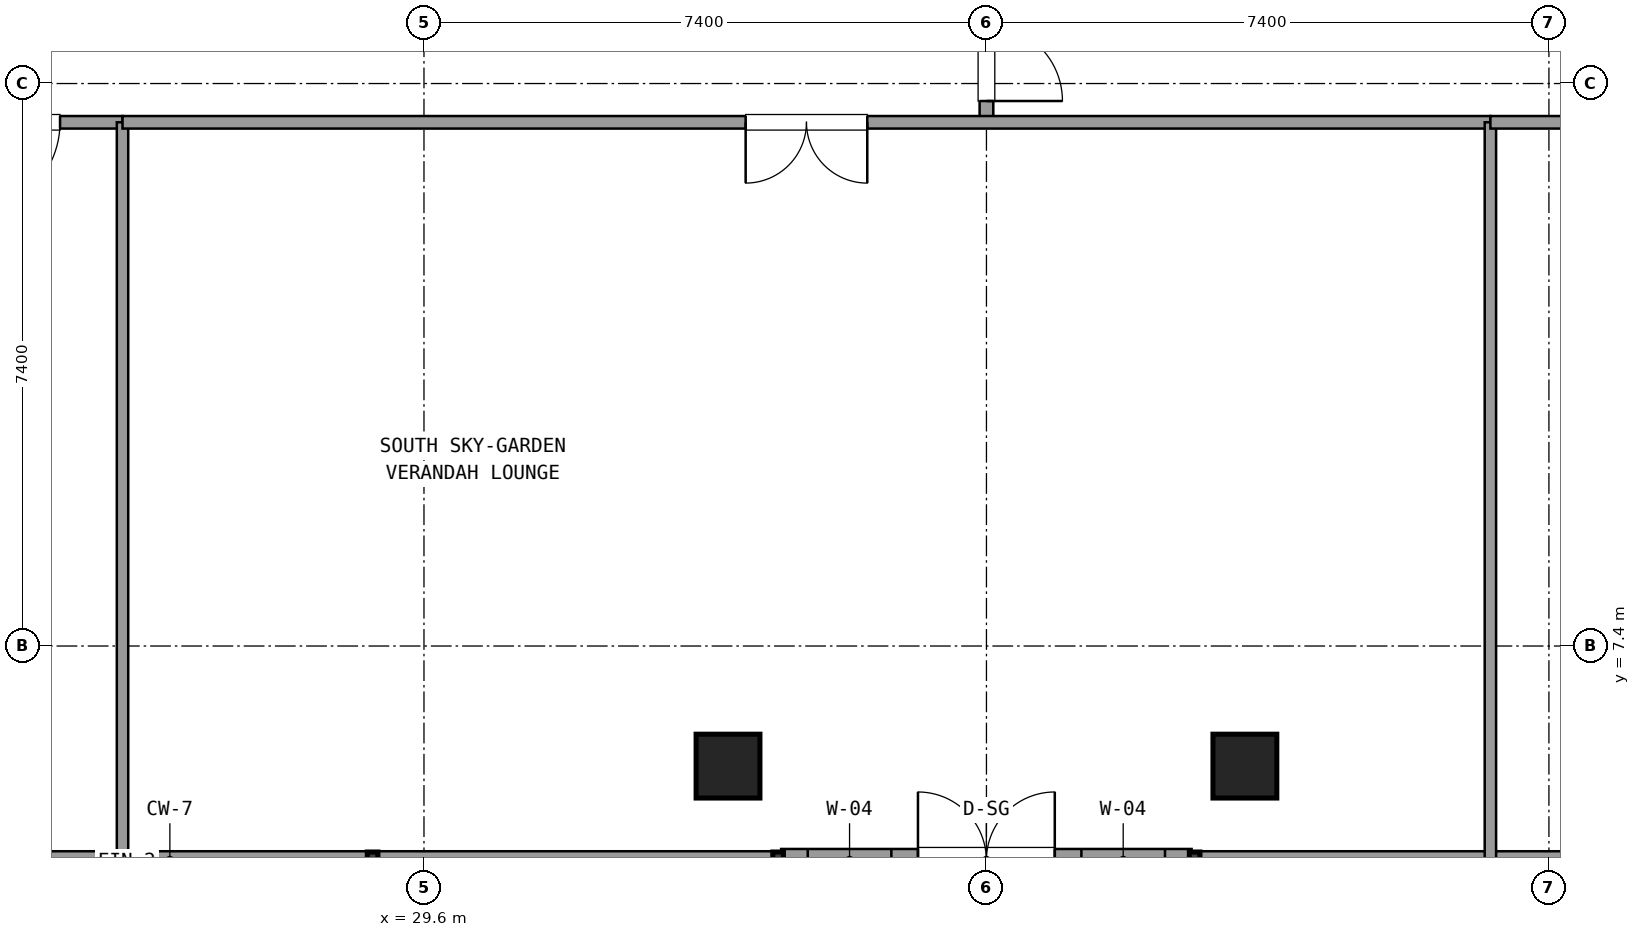
"""IFC4 building model, lengths in metres.
Left out: names, types, materials, properties, quantities, classifications, styles, units other than length and angle.
Written with IfcOpenShell. Run it as: python <this file> out.ifc"""

import sys

from ifc_helpers import new_model, si_unit, direction, frame, frame_2d, origin, origin_2d, place, context, subcontext, project, spatial, rectangle, extrude, element, fill, save


model = new_model("IFC4")
c1 = context("Model", 3, precision=1e-05, world=origin(), true_north=direction((0.0, 1.0)))
c2 = subcontext(c1, "Body", "Model", "MODEL_VIEW")
j1 = project(units=[si_unit("LENGTHUNIT", "METRE"), si_unit("PLANEANGLEUNIT", "RADIAN")], contexts=[c1])
p1 = place(None, origin())
s1 = spatial("IfcSite", under=j1, at=p1, CompositionType="ELEMENT")
p2 = place(p1, origin())
s2 = spatial("IfcBuilding", under=s1, at=p2, CompositionType="ELEMENT")
p3 = place(p2, frame((0.0, 0.0, 237.06)))
s3 = spatial("IfcBuildingStorey", under=s2, at=p3, CompositionType="ELEMENT", Elevation=237.06)
for number, where, z_axis, x_axis in (
    (1, (33.6, 5.82, 0.0), (0.0, 0.0, 1.0), (1.0, 0.0, 0.0)),
    (2, (40.4, 5.82, 0.0), (0.0, 0.0, 1.0), (1.0, 0.0, 0.0)),
):
    element("IfcColumn", number, at=place(p3, frame(where, z_axis=z_axis, x_axis=x_axis)), inside=s3, PredefinedType="COLUMN", context=c2, shape_type="SweptSolid", body=[
        extrude(rectangle(XDim=0.84, YDim=0.84, at=origin_2d()), origin(), (0.0, 0.0, 1.0), 5.76),
    ])
p4 = place(p3, frame((34.299, 4.58, 0.0), z_axis=(0.0, 0.0, 1.0), x_axis=(1.0, 0.0, 0.0)))
e3 = element("IfcWall", 3, at=p4, inside=s3, PredefinedType="SOLIDWALL", context=c2, shape_type="SweptSolid", body=[
    extrude(rectangle(XDim=5.4, YDim=0.3, at=frame_2d((2.7, 0.0))), origin(), (0.0, 0.0, 1.0), 4.85),
])
p5 = place(p4, frame((1.8, 0.0, 0.0)))
e4 = element("IfcOpeningElement", 4, at=p5, cuts=e3, PredefinedType="OPENING", context=c2, shape_type="SweptSolid", body=[
    extrude(rectangle(XDim=1.8, YDim=2.25, at=frame_2d((0.9, 1.125))), frame((0.0, 0.16, 0.0), z_axis=(0.0, -1.0, 0.0), x_axis=(1.0, 0.0, 0.0)), (0.0, 0.0, 1.0), 0.32),
])
p6 = place(p4, frame((0.35, 0.0, 0.4)))
e5 = element("IfcOpeningElement", 5, at=p6, cuts=e3, PredefinedType="OPENING", context=c2, shape_type="SweptSolid", body=[
    extrude(rectangle(XDim=1.1, YDim=1.8, at=frame_2d((0.55, 0.9))), frame((0.0, 0.16, 0.0), z_axis=(0.0, -1.0, 0.0), x_axis=(1.0, 0.0, 0.0)), (0.0, 0.0, 1.0), 0.32),
])
p7 = place(p4, frame((3.95, 0.0, 0.4)))
e6 = element("IfcOpeningElement", 6, at=p7, cuts=e3, PredefinedType="OPENING", context=c2, shape_type="SweptSolid", body=[
    extrude(rectangle(XDim=1.1, YDim=1.8, at=frame_2d((0.55, 0.9))), frame((0.0, 0.16, 0.0), z_axis=(0.0, -1.0, 0.0), x_axis=(1.0, 0.0, 0.0)), (0.0, 0.0, 1.0), 0.32),
])
p8 = place(p3, frame((18.255, 4.58, 0.0), z_axis=(0.0, 0.0, 1.0), x_axis=(1.0, 0.0, 0.0)))
e7 = element("IfcWall", 7, at=p8, inside=s3, PredefinedType="SOLIDWALL", context=c2, shape_type="SweptSolid", body=[
    extrude(rectangle(XDim=16.004, YDim=0.24, at=frame_2d((8.002, 0.0))), origin(), (0.0, 0.0, 1.0), 0.85),
])
p9 = place(p3, frame((39.739, 4.58, 0.0), z_axis=(0.0, 0.0, 1.0), x_axis=(1.0, 0.0, 0.0)))
e8 = element("IfcWall", 8, at=p9, inside=s3, PredefinedType="SOLIDWALL", context=c2, shape_type="SweptSolid", body=[
    extrude(rectangle(XDim=16.006, YDim=0.24, at=frame_2d((8.003, 0.0))), origin(), (0.0, 0.0, 1.0), 0.85),
])
p10 = place(p3, frame((37.0, 14.29, 0.0), z_axis=(0.0, 0.0, 1.0), x_axis=(0.0, 1.0, 0.0)))
e9 = element("IfcWall", 9, at=p10, inside=s3, PredefinedType="PARTITIONING", context=c2, shape_type="SweptSolid", body=[
    extrude(rectangle(XDim=2.56, YDim=0.18, at=frame_2d((1.28, 0.0))), origin(), (0.0, 0.0, 1.0), 4.77),
])
p11 = place(p10, frame((0.28, 0.0, 0.0)))
e10 = element("IfcOpeningElement", 10, at=p11, cuts=e9, PredefinedType="OPENING", context=c2, shape_type="SweptSolid", body=[
    extrude(rectangle(XDim=2.0, YDim=2.2, at=frame_2d((1.0, 1.1))), frame((0.0, 0.1, 0.0), z_axis=(0.0, -1.0, 0.0), x_axis=(1.0, 0.0, 0.0)), (0.0, 0.0, 1.0), 0.2),
])
p12 = place(p3, frame((22.79, 14.29, 0.0), z_axis=(0.0, 0.0, 1.0), x_axis=(1.0, 0.0, 0.0)))
e11 = element("IfcWall", 11, at=p12, inside=s3, PredefinedType="PARTITIONING", context=c2, shape_type="SweptSolid", body=[
    extrude(rectangle(XDim=2.844, YDim=0.165, at=frame_2d((1.422, 0.0))), origin(), (0.0, 0.0, 1.0), 4.77),
])
p13 = place(p12, frame((0.822, 0.0, 0.0)))
e12 = element("IfcOpeningElement", 12, at=p13, cuts=e11, PredefinedType="OPENING", context=c2, shape_type="SweptSolid", body=[
    extrude(rectangle(XDim=1.2, YDim=2.15, at=frame_2d((0.6, 1.075))), frame((0.0, 0.093, 0.0), z_axis=(0.0, -1.0, 0.0), x_axis=(1.0, 0.0, 0.0)), (0.0, 0.0, 1.0), 0.185),
])
p14 = place(p3, frame((25.634, 14.29, 0.0), z_axis=(0.0, 0.0, 1.0), x_axis=(0.0, -1.0, 0.0)))
e13 = element("IfcWall", 13, at=p14, inside=s3, PredefinedType="PARTITIONING", context=c2, shape_type="SweptSolid", body=[
    extrude(rectangle(XDim=9.69, YDim=0.15, at=frame_2d((4.845, 0.0))), origin(), (0.0, 0.0, 1.0), 4.77),
])
p15 = place(p3, frame((25.634, 14.29, 0.0), z_axis=(0.0, 0.0, 1.0), x_axis=(1.0, 0.0, 0.0)))
e14 = element("IfcWall", 14, at=p15, inside=s3, PredefinedType="PARTITIONING", context=c2, shape_type="SweptSolid", body=[
    extrude(rectangle(XDim=17.996, YDim=0.165, at=frame_2d((8.998, 0.0))), origin(), (0.0, 0.0, 1.0), 4.77),
])
p16 = place(p15, frame((8.198, 0.0, 0.0)))
e15 = element("IfcOpeningElement", 15, at=p16, cuts=e14, PredefinedType="OPENING", context=c2, shape_type="SweptSolid", body=[
    extrude(rectangle(XDim=1.6, YDim=2.2, at=frame_2d((0.8, 1.1))), frame((0.0, 0.093, 0.0), z_axis=(0.0, -1.0, 0.0), x_axis=(1.0, 0.0, 0.0)), (0.0, 0.0, 1.0), 0.185),
])
p17 = place(p3, frame((43.63, 14.29, 0.0), z_axis=(0.0, 0.0, 1.0), x_axis=(0.0, -1.0, 0.0)))
e16 = element("IfcWall", 16, at=p17, inside=s3, PredefinedType="PARTITIONING", context=c2, shape_type="SweptSolid", body=[
    extrude(rectangle(XDim=9.69, YDim=0.15, at=frame_2d((4.845, 0.0))), origin(), (0.0, 0.0, 1.0), 4.77),
])
p18 = place(p3, frame((43.63, 14.29, 0.0), z_axis=(0.0, 0.0, 1.0), x_axis=(1.0, 0.0, 0.0)))
e17 = element("IfcWall", 17, at=p18, inside=s3, PredefinedType="PARTITIONING", context=c2, shape_type="SweptSolid", body=[
    extrude(rectangle(XDim=5.08, YDim=0.165, at=frame_2d((2.54, 0.0))), origin(), (0.0, 0.0, 1.0), 4.77),
])
p19 = place(p18, frame((1.74, 0.0, 0.0)))
e18 = element("IfcOpeningElement", 18, at=p19, cuts=e17, PredefinedType="OPENING", context=c2, shape_type="SweptSolid", body=[
    extrude(rectangle(XDim=1.6, YDim=2.2, at=frame_2d((0.8, 1.1))), frame((0.0, 0.093, 0.0), z_axis=(0.0, -1.0, 0.0), x_axis=(1.0, 0.0, 0.0)), (0.0, 0.0, 1.0), 0.185),
])
p20 = place(p11, frame((2.0, 0.0, 0.0), z_axis=(0.0, 0.0, 1.0), x_axis=(-1.0, 0.0, 0.0)))
e19 = element("IfcDoor", 19, at=p20, inside=s3, OperationType="DOUBLE_DOOR_SINGLE_SWING", PredefinedType="DOOR", context=c2, shape_type="SweptSolid", body=[
    extrude(rectangle(XDim=2.0, YDim=2.2, at=frame_2d((1.0, 1.1))), frame((0.0, 0.025, 0.0), z_axis=(0.0, -1.0, 0.0), x_axis=(1.0, 0.0, 0.0)), (0.0, 0.0, 1.0), 0.05),
])
fill(e10, e19)
p21 = place(p13, frame((1.2, 0.0, 0.0), z_axis=(0.0, 0.0, 1.0), x_axis=(-1.0, 0.0, 0.0)))
e20 = element("IfcDoor", 20, at=p21, inside=s3, OperationType="SINGLE_SWING_LEFT", PredefinedType="DOOR", context=c2, shape_type="SweptSolid", body=[
    extrude(rectangle(XDim=1.2, YDim=2.15, at=frame_2d((0.6, 1.075))), frame((0.0, 0.025, 0.0), z_axis=(0.0, -1.0, 0.0), x_axis=(1.0, 0.0, 0.0)), (0.0, 0.0, 1.0), 0.05),
])
fill(e12, e20)
p22 = place(p16, frame((1.6, 0.0, 0.0), z_axis=(0.0, 0.0, 1.0), x_axis=(-1.0, 0.0, 0.0)))
e21 = element("IfcDoor", 21, at=p22, inside=s3, OperationType="DOUBLE_DOOR_SINGLE_SWING", PredefinedType="DOOR", context=c2, shape_type="SweptSolid", body=[
    extrude(rectangle(XDim=1.6, YDim=2.2, at=frame_2d((0.8, 1.1))), frame((0.0, 0.025, 0.0), z_axis=(0.0, -1.0, 0.0), x_axis=(1.0, 0.0, 0.0)), (0.0, 0.0, 1.0), 0.05),
])
fill(e15, e21)
save(model, sys.argv[1])
